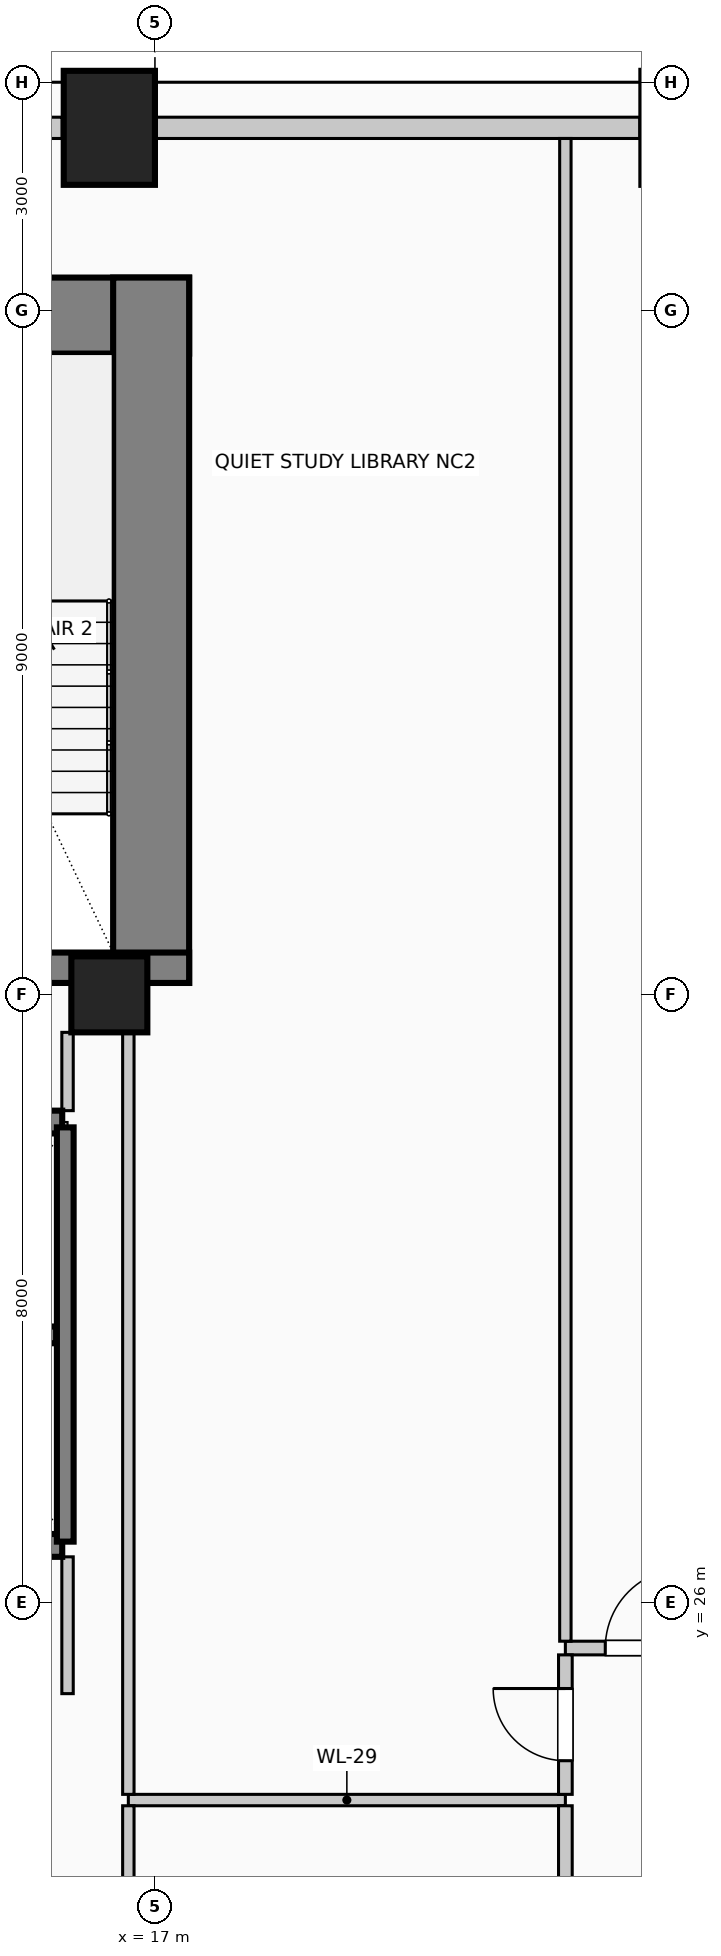
"""IFC4 building model, lengths in metres.
Left out: names, types, materials, properties, quantities, classifications, styles, units other than length and angle.
Written with IfcOpenShell. Run it as: python <this file> out.ifc"""

import sys

from ifc_helpers import new_model, si_unit, direction, frame, frame_2d, origin, origin_2d, place, context, subcontext, project, spatial, rectangle, circle, extrude, element, fill, save


model = new_model("IFC4")
c1 = context("Model", 3, precision=1e-05, world=origin(), true_north=direction((0.0, 1.0)))
c2 = subcontext(c1, "Body", "Model", "MODEL_VIEW")
j1 = project(units=[si_unit("LENGTHUNIT", "METRE"), si_unit("PLANEANGLEUNIT", "RADIAN")], contexts=[c1])
p1 = place(None, origin())
s1 = spatial("IfcSite", under=j1, at=p1, CompositionType="ELEMENT")
p2 = place(p1, origin())
s2 = spatial("IfcBuilding", under=s1, at=p2, CompositionType="ELEMENT")
p3 = place(p2, frame((0.0, 0.0, 78.6)))
s3 = spatial("IfcBuildingStorey", under=s2, at=p3, CompositionType="ELEMENT", Elevation=78.6)
p4 = place(p3, frame((2.55, 42.93, 0.0), z_axis=(0.0, 0.0, 1.0), x_axis=(1.0, 0.0, 0.0)))
e1 = element("IfcWall", 1, at=p4, inside=s3, PredefinedType="SHEAR", context=c2, shape_type="SweptSolid", body=[
    extrude(rectangle(XDim=14.9, YDim=1.0, at=frame_2d((7.45, 0.0))), origin(), (0.0, 0.0, 1.0), 4.0),
])
p5 = place(p3, frame((16.95, 34.15, 0.0), z_axis=(0.0, 0.0, 1.0), x_axis=(0.0, 1.0, 0.0)))
e2 = element("IfcWall", 2, at=p5, inside=s3, PredefinedType="SHEAR", context=c2, shape_type="SweptSolid", body=[
    extrude(rectangle(XDim=9.28, YDim=1.0, at=frame_2d((4.64, 0.0))), origin(), (0.0, 0.0, 1.0), 4.0),
])
p6 = place(p3, frame((12.29, 34.35, 0.0), z_axis=(0.0, 0.0, 1.0), x_axis=(1.0, 0.0, 0.0)))
e3 = element("IfcWall", 3, at=p6, inside=s3, PredefinedType="SHEAR", context=c2, shape_type="SweptSolid", body=[
    extrude(rectangle(XDim=5.16, YDim=0.4, at=frame_2d((2.58, 0.0))), origin(), (0.0, 0.0, 1.0), 4.0),
])
p7 = place(p6, frame((1.4, 0.0, 0.0)))
e4 = element("IfcOpeningElement", 4, at=p7, cuts=e3, PredefinedType="OPENING", context=c2, shape_type="SweptSolid", body=[
    extrude(rectangle(XDim=1.15, YDim=2.2, at=frame_2d((0.575, 1.1))), frame((0.0, 0.21, 0.0), z_axis=(0.0, -1.0, 0.0), x_axis=(1.0, 0.0, 0.0)), (0.0, 0.0, 1.0), 0.42),
])
p8 = place(p3, frame((16.4, 45.4, 0.0), z_axis=(0.0, 0.0, 1.0), x_axis=(1.0, 0.0, 0.0)))
e5 = element("IfcColumn", 5, at=p8, inside=s3, PredefinedType="COLUMN", context=c2, shape_type="SweptSolid", body=[
    extrude(rectangle(XDim=1.2, YDim=1.5, at=origin_2d()), origin(), (0.0, 0.0, 1.0), 4.0),
])
p9 = place(p3, frame((16.4, 34.0, 0.0), z_axis=(0.0, 0.0, 1.0), x_axis=(1.0, 0.0, 0.0)))
e6 = element("IfcColumn", 6, at=p9, inside=s3, PredefinedType="COLUMN", context=c2, shape_type="SweptSolid", body=[
    extrude(circle(Radius=0.5, at=origin_2d()), origin(), (0.0, 0.0, 1.0), 4.0),
])
p10 = place(p3, frame((14.47, 45.4, 0.0), z_axis=(0.0, 0.0, 1.0), x_axis=(1.0, 0.0, 0.0)))
e7 = element("IfcWall", 7, at=p10, inside=s3, PredefinedType="SOLIDWALL", context=c2, shape_type="SweptSolid", body=[
    extrude(rectangle(XDim=1.31, YDim=0.28, at=frame_2d((0.655, 0.0))), origin(), (0.0, 0.0, 1.0), 2.81),
])
p11 = place(p3, frame((17.02, 45.4, 0.0), z_axis=(0.0, 0.0, 1.0), x_axis=(1.0, 0.0, 0.0)))
e8 = element("IfcWall", 8, at=p11, inside=s3, PredefinedType="SOLIDWALL", context=c2, shape_type="SweptSolid", body=[
    extrude(rectangle(XDim=6.36, YDim=0.28, at=frame_2d((3.18, 0.0))), origin(), (0.0, 0.0, 1.0), 2.81),
])
for number, where, z_axis, x_axis in (
    (9, (15.78, 26.75, 0.0), (0.0, 0.0, 1.0), (-1.0, 0.0, 0.0)),
    (10, (14.0, 32.32, 0.0), (0.0, 0.0, 1.0), (1.0, 0.0, 0.0)),
):
    element("IfcWall", number, at=place(p3, frame(where, z_axis=z_axis, x_axis=x_axis)), inside=s3, PredefinedType="SOLIDWALL", context=c2, shape_type="SweptSolid", body=[
        extrude(rectangle(XDim=1.78, YDim=0.3, at=frame_2d((0.89, 0.0))), origin(), (0.0, 0.0, 1.0), 4.0),
    ])
p12 = place(p3, frame((15.82, 26.8, 0.0), z_axis=(0.0, 0.0, 1.0), x_axis=(0.0, 1.0, 0.0)))
e11 = element("IfcWall", 11, at=p12, inside=s3, PredefinedType="SOLIDWALL", context=c2, shape_type="SweptSolid", body=[
    extrude(rectangle(XDim=5.45, YDim=0.22, at=frame_2d((2.725, 0.0))), origin(), (0.0, 0.0, 1.0), 4.0),
])
p13 = place(p3, frame((12.3, 29.52, 0.0), z_axis=(0.0, 0.0, 1.0), x_axis=(1.0, 0.0, 0.0)))
e12 = element("IfcWall", 12, at=p13, inside=s3, PredefinedType="SOLIDWALL", context=c2, shape_type="SweptSolid", body=[
    extrude(rectangle(XDim=3.4, YDim=0.22, at=frame_2d((1.7, 0.0))), origin(), (0.0, 0.0, 1.0), 4.0),
])
p14 = place(p3, frame((16.65, 23.4, 0.0), z_axis=(0.0, 0.0, 1.0), x_axis=(1.0, 0.0, 0.0)))
e13 = element("IfcWall", 13, at=p14, inside=s3, PredefinedType="PARTITIONING", context=c2, shape_type="SweptSolid", body=[
    extrude(rectangle(XDim=5.75, YDim=0.15, at=frame_2d((2.875, 0.0))), origin(), (0.0, 0.0, 1.0), 3.66),
])
p15 = place(p3, frame((22.4, 25.4, 0.0), z_axis=(0.0, 0.0, 1.0), x_axis=(1.0, 0.0, 0.0)))
e14 = element("IfcWall", 14, at=p15, inside=s3, PredefinedType="PARTITIONING", context=c2, shape_type="SweptSolid", body=[
    extrude(rectangle(XDim=2.1, YDim=0.18, at=frame_2d((1.05, 0.0))), origin(), (0.0, 0.0, 1.0), 3.055),
])
p16 = place(p15, frame((0.525, 0.0, 0.0)))
e15 = element("IfcOpeningElement", 15, at=p16, cuts=e14, PredefinedType="OPENING", context=c2, shape_type="SweptSolid", body=[
    extrude(rectangle(XDim=1.05, YDim=2.15, at=frame_2d((0.525, 1.075))), frame((0.0, 0.1, 0.0), z_axis=(0.0, -1.0, 0.0), x_axis=(1.0, 0.0, 0.0)), (0.0, 0.0, 1.0), 0.2),
])
p17 = place(p3, frame((15.85, 24.8, 0.0), z_axis=(0.0, 0.0, 1.0), x_axis=(0.0, 1.0, 0.0)))
e16 = element("IfcWall", 16, at=p17, inside=s3, PredefinedType="PARTITIONING", context=c2, shape_type="SweptSolid", body=[
    extrude(rectangle(XDim=1.8, YDim=0.15, at=frame_2d((0.9, 0.0))), origin(), (0.0, 0.0, 1.0), 3.66),
])
p18 = place(p3, frame((15.85, 32.47, 0.0), z_axis=(0.0, 0.0, 1.0), x_axis=(0.0, 1.0, 0.0)))
e17 = element("IfcWall", 17, at=p18, inside=s3, PredefinedType="PARTITIONING", context=c2, shape_type="SweptSolid", body=[
    extrude(rectangle(XDim=1.03, YDim=0.15, at=frame_2d((0.515, 0.0))), origin(), (0.0, 0.0, 1.0), 3.66),
])
p19 = place(p3, frame((16.65, 20.29, 0.0), z_axis=(0.0, 0.0, 1.0), x_axis=(0.0, 1.0, 0.0)))
e18 = element("IfcWall", 18, at=p19, inside=s3, PredefinedType="PARTITIONING", context=c2, shape_type="SweptSolid", body=[
    extrude(rectangle(XDim=3.035, YDim=0.15, at=frame_2d((1.518, 0.0))), origin(), (0.0, 0.0, 1.0), 2.955),
])
p20 = place(p3, frame((16.65, 23.475, 0.0), z_axis=(0.0, 0.0, 1.0), x_axis=(0.0, 1.0, 0.0)))
e19 = element("IfcWall", 19, at=p20, inside=s3, PredefinedType="PARTITIONING", context=c2, shape_type="SweptSolid", body=[
    extrude(rectangle(XDim=10.025, YDim=0.15, at=frame_2d((5.012, 0.0))), origin(), (0.0, 0.0, 1.0), 2.955),
])
p21 = place(p3, frame((22.4, 20.29, 0.0), z_axis=(0.0, 0.0, 1.0), x_axis=(0.0, 1.0, 0.0)))
e20 = element("IfcWall", 20, at=p21, inside=s3, PredefinedType="PARTITIONING", context=c2, shape_type="SweptSolid", body=[
    extrude(rectangle(XDim=3.035, YDim=0.18, at=frame_2d((1.518, 0.0))), origin(), (0.0, 0.0, 1.0), 3.66),
])
p22 = place(p3, frame((22.4, 23.475, 0.0), z_axis=(0.0, 0.0, 1.0), x_axis=(0.0, 1.0, 0.0)))
e21 = element("IfcWall", 21, at=p22, inside=s3, PredefinedType="PARTITIONING", context=c2, shape_type="SweptSolid", body=[
    extrude(rectangle(XDim=1.835, YDim=0.18, at=frame_2d((0.917, 0.0))), origin(), (0.0, 0.0, 1.0), 3.66),
])
p23 = place(p22, frame((0.442, 0.0, 0.0)))
e22 = element("IfcOpeningElement", 22, at=p23, cuts=e21, PredefinedType="OPENING", context=c2, shape_type="SweptSolid", body=[
    extrude(rectangle(XDim=0.95, YDim=2.15, at=frame_2d((0.475, 1.075))), frame((0.0, 0.1, 0.0), z_axis=(0.0, -1.0, 0.0), x_axis=(1.0, 0.0, 0.0)), (0.0, 0.0, 1.0), 0.2),
])
p24 = place(p3, frame((22.4, 25.49, 0.0), z_axis=(0.0, 0.0, 1.0), x_axis=(0.0, 1.0, 0.0)))
e23 = element("IfcWall", 23, at=p24, inside=s3, PredefinedType="PARTITIONING", context=c2, shape_type="SweptSolid", body=[
    extrude(rectangle(XDim=19.77, YDim=0.15, at=frame_2d((9.885, 0.0))), origin(), (0.0, 0.0, 1.0), 3.66),
])
p25 = place(p16, origin())
e24 = element("IfcDoor", 24, at=p25, inside=s3, OperationType="SINGLE_SWING_RIGHT", PredefinedType="DOOR", context=c2, shape_type="SweptSolid", body=[
    extrude(rectangle(XDim=1.05, YDim=2.15, at=frame_2d((0.525, 1.075))), frame((0.0, 0.025, 0.0), z_axis=(0.0, -1.0, 0.0), x_axis=(1.0, 0.0, 0.0)), (0.0, 0.0, 1.0), 0.05),
])
fill(e15, e24)
p26 = place(p23, origin())
e25 = element("IfcDoor", 25, at=p26, inside=s3, OperationType="SINGLE_SWING_RIGHT", PredefinedType="DOOR", context=c2, shape_type="SweptSolid", body=[
    extrude(rectangle(XDim=0.95, YDim=2.15, at=frame_2d((0.475, 1.075))), frame((0.0, 0.025, 0.0), z_axis=(0.0, -1.0, 0.0), x_axis=(1.0, 0.0, 0.0)), (0.0, 0.0, 1.0), 0.05),
])
fill(e22, e25)
save(model, sys.argv[1])
